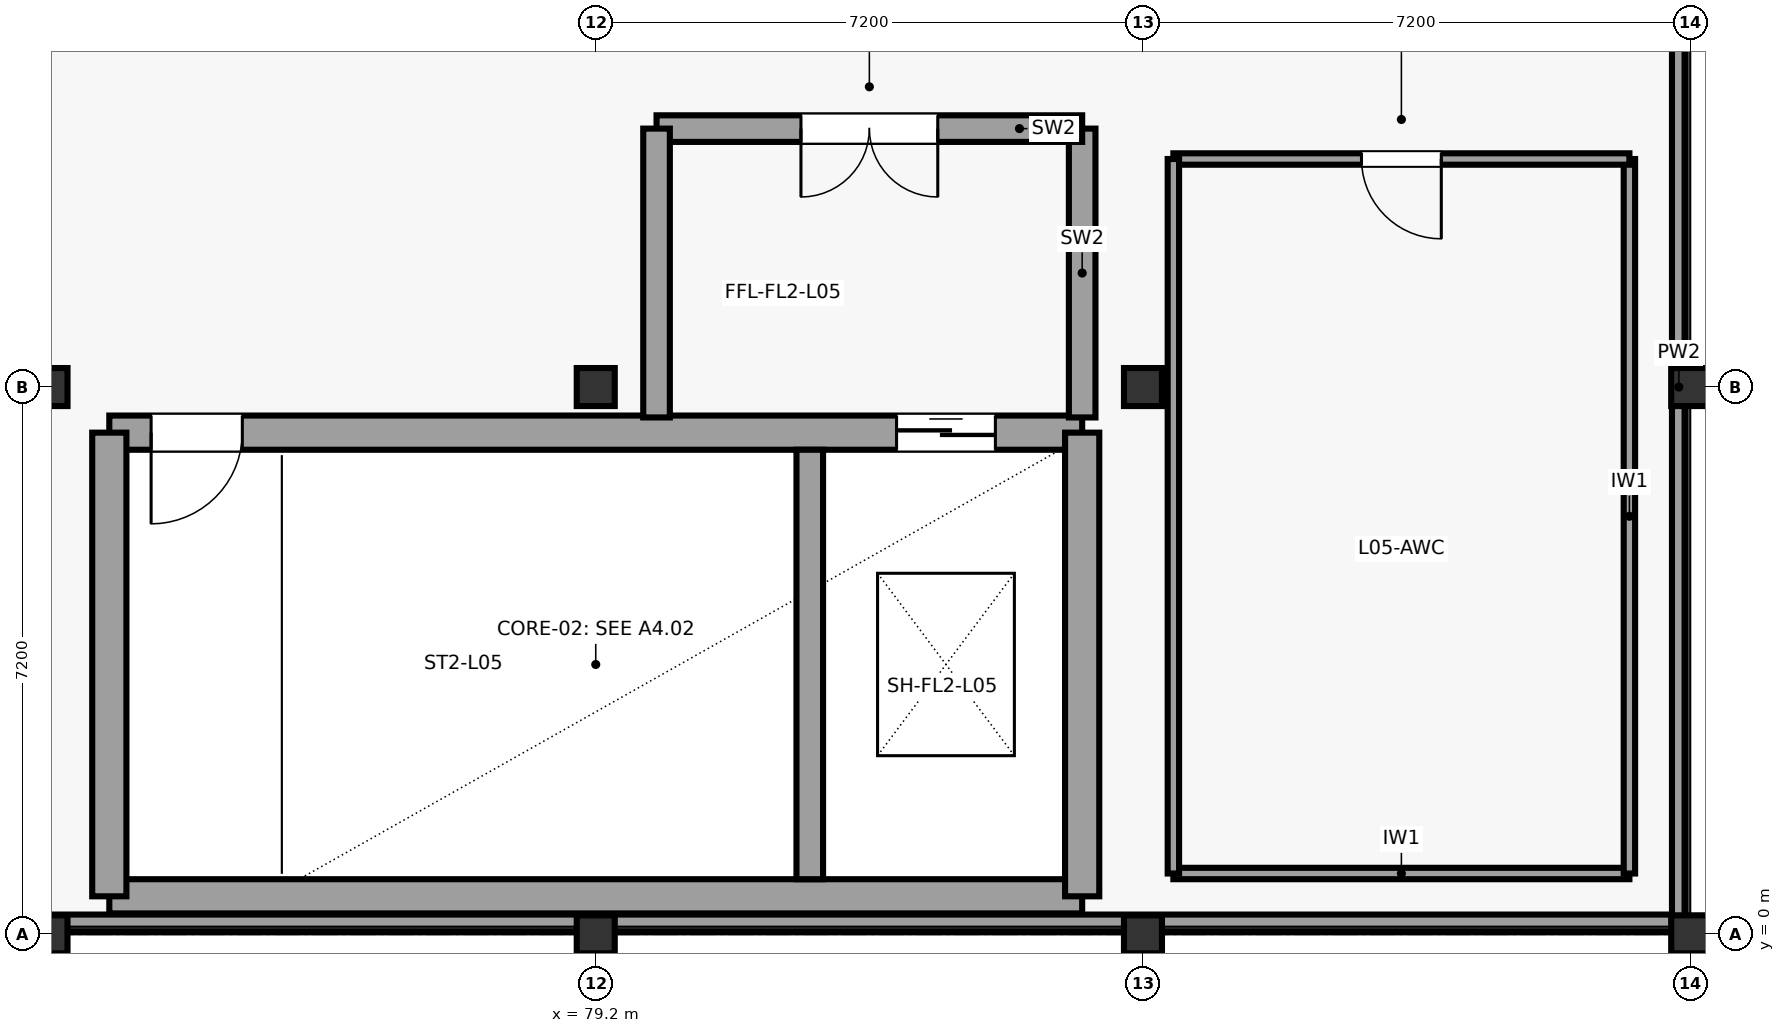
"""IFC4 building model, lengths in metres.
Left out: names, types, materials, properties, quantities, classifications, styles, units other than length and angle.
Written with IfcOpenShell. Run it as: python <this file> out.ifc"""

import sys

from ifc_helpers import new_model, si_unit, direction, frame, frame_2d, origin, origin_2d, place, context, subcontext, project, spatial, rectangle, extrude, element, fill, save


model = new_model("IFC4")
c1 = context("Model", 3, precision=1e-05, world=origin(), true_north=direction((0.0, 1.0)))
c2 = subcontext(c1, "Body", "Model", "MODEL_VIEW")
j1 = project(units=[si_unit("LENGTHUNIT", "METRE"), si_unit("PLANEANGLEUNIT", "RADIAN")], contexts=[c1])
p1 = place(None, origin())
s1 = spatial("IfcSite", under=j1, at=p1, CompositionType="ELEMENT")
p2 = place(p1, origin())
s2 = spatial("IfcBuilding", under=s1, at=p2, CompositionType="ELEMENT")
p3 = place(p2, frame((0.0, 0.0, 23.0)))
s3 = spatial("IfcBuildingStorey", under=s2, at=p3, CompositionType="ELEMENT", Elevation=23.0)
for number, where, z_axis, x_axis in (
    (1, (72.0, 0.0, 0.0), (0.0, 0.0, 1.0), (1.0, 0.0, 0.0)),
    (2, (72.0, 7.2, 0.0), (0.0, 0.0, 1.0), (1.0, 0.0, 0.0)),
    (3, (79.2, 0.0, 0.0), (0.0, 0.0, 1.0), (1.0, 0.0, 0.0)),
    (4, (79.2, 7.2, 0.0), (0.0, 0.0, 1.0), (1.0, 0.0, 0.0)),
    (5, (86.4, 0.0, 0.0), (0.0, 0.0, 1.0), (1.0, 0.0, 0.0)),
    (6, (86.4, 7.2, 0.0), (0.0, 0.0, 1.0), (1.0, 0.0, 0.0)),
    (7, (93.6, 0.0, 0.0), (0.0, 0.0, 1.0), (1.0, 0.0, 0.0)),
    (8, (93.6, 7.2, 0.0), (0.0, 0.0, 1.0), (1.0, 0.0, 0.0)),
):
    element("IfcColumn", number, at=place(p3, frame(where, z_axis=z_axis, x_axis=x_axis)), inside=s3, PredefinedType="COLUMN", context=c2, shape_type="SweptSolid", body=[
        extrude(rectangle(XDim=0.5, YDim=0.5, at=origin_2d()), origin(), (0.0, 0.0, 1.0), 4.5),
    ])
p4 = place(p3, frame((72.8, 0.5, 0.0), z_axis=(0.0, 0.0, 1.0), x_axis=(1.0, 0.0, 0.0)))
e9 = element("IfcWall", 9, at=p4, inside=s3, PredefinedType="SHEAR", context=c2, shape_type="SweptSolid", body=[
    extrude(rectangle(XDim=12.8, YDim=0.45, at=frame_2d((6.4, 0.0))), origin(), (0.0, 0.0, 1.0), 4.28),
])
p5 = place(p3, frame((72.8, 6.6, 0.0), z_axis=(0.0, 0.0, 1.0), x_axis=(1.0, 0.0, 0.0)))
e10 = element("IfcWall", 10, at=p5, inside=s3, PredefinedType="SHEAR", context=c2, shape_type="SweptSolid", body=[
    extrude(rectangle(XDim=12.8, YDim=0.45, at=frame_2d((6.4, 0.0))), origin(), (0.0, 0.0, 1.0), 4.28),
])
p6 = place(p5, frame((0.55, 0.0, 0.0)))
e11 = element("IfcOpeningElement", 11, at=p6, cuts=e10, PredefinedType="OPENING", context=c2, shape_type="SweptSolid", body=[
    extrude(rectangle(XDim=1.2, YDim=2.25, at=frame_2d((0.6, 1.125))), frame((0.0, 0.235, 0.0), z_axis=(0.0, -1.0, 0.0), x_axis=(1.0, 0.0, 0.0)), (0.0, 0.0, 1.0), 0.47),
])
p7 = place(p5, frame((10.358, 0.0, 0.0)))
e12 = element("IfcOpeningElement", 12, at=p7, cuts=e10, PredefinedType="OPENING", context=c2, shape_type="SweptSolid", body=[
    extrude(rectangle(XDim=1.3, YDim=2.25, at=frame_2d((0.65, 1.125))), frame((0.0, 0.235, 0.0), z_axis=(0.0, -1.0, 0.0), x_axis=(1.0, 0.0, 0.0)), (0.0, 0.0, 1.0), 0.47),
])
for number, where, z_axis, x_axis in (
    (13, (72.8, 0.5, 0.0), (0.0, 0.0, 1.0), (0.0, 1.0, 0.0)),
    (14, (85.6, 0.5, 0.0), (0.0, 0.0, 1.0), (0.0, 1.0, 0.0)),
):
    element("IfcWall", number, at=place(p3, frame(where, z_axis=z_axis, x_axis=x_axis)), inside=s3, PredefinedType="SHEAR", context=c2, shape_type="SweptSolid", body=[
        extrude(rectangle(XDim=6.1, YDim=0.45, at=frame_2d((3.05, 0.0))), origin(), (0.0, 0.0, 1.0), 4.28),
    ])
p8 = place(p3, frame((82.016, 0.725, 0.0), z_axis=(0.0, 0.0, 1.0), x_axis=(0.0, 1.0, 0.0)))
e15 = element("IfcWall", 15, at=p8, inside=s3, PredefinedType="SHEAR", context=c2, shape_type="SweptSolid", body=[
    extrude(rectangle(XDim=5.65, YDim=0.35, at=frame_2d((2.825, 0.0))), origin(), (0.0, 0.0, 1.0), 4.28),
])
p9 = place(p3, frame((0.15, 0.15, 4.5), z_axis=(0.0, 0.0, 1.0), x_axis=(1.0, 0.0, 0.0)))
e16 = element("IfcWall", 16, at=p9, inside=s3, PredefinedType="PARAPET", context=c2, shape_type="SweptSolid", body=[
    extrude(rectangle(XDim=93.3, YDim=0.22, at=frame_2d((46.65, 0.0))), origin(), (0.0, 0.0, 1.0), 1.15),
])
p10 = place(p3, frame((93.45, 0.15, 4.5), z_axis=(0.0, 0.0, 1.0), x_axis=(0.0, 1.0, 0.0)))
e17 = element("IfcWall", 17, at=p10, inside=s3, PredefinedType="PARAPET", context=c2, shape_type="SweptSolid", body=[
    extrude(rectangle(XDim=14.1, YDim=0.18, at=frame_2d((7.05, 0.0))), origin(), (0.0, 0.0, 1.0), 1.15),
])
p11 = place(p3, frame((85.6, 6.8, 0.0), z_axis=(0.0, 0.0, 1.0), x_axis=(0.0, 1.0, 0.0)))
e18 = element("IfcWall", 18, at=p11, inside=s3, PredefinedType="SHEAR", context=c2, shape_type="SweptSolid", body=[
    extrude(rectangle(XDim=3.8, YDim=0.35, at=frame_2d((1.9, 0.0))), origin(), (0.0, 0.0, 1.0), 3.34),
])
p12 = place(p3, frame((85.6, 10.6, 0.0), z_axis=(0.0, 0.0, 1.0), x_axis=(-1.0, 0.0, 0.0)))
e19 = element("IfcWall", 19, at=p12, inside=s3, PredefinedType="SHEAR", context=c2, shape_type="SweptSolid", body=[
    extrude(rectangle(XDim=5.6, YDim=0.35, at=frame_2d((2.8, 0.0))), origin(), (0.0, 0.0, 1.0), 3.34),
])
p13 = place(p12, frame((1.9, 0.0, 0.0)))
e20 = element("IfcOpeningElement", 20, at=p13, cuts=e19, PredefinedType="OPENING", context=c2, shape_type="SweptSolid", body=[
    extrude(rectangle(XDim=1.8, YDim=2.3, at=frame_2d((0.9, 1.15))), frame((0.0, 0.185, 0.0), z_axis=(0.0, -1.0, 0.0), x_axis=(1.0, 0.0, 0.0)), (0.0, 0.0, 1.0), 0.37),
])
p14 = place(p3, frame((80.0, 10.6, 0.0), z_axis=(0.0, 0.0, 1.0), x_axis=(0.0, -1.0, 0.0)))
e21 = element("IfcWall", 21, at=p14, inside=s3, PredefinedType="SHEAR", context=c2, shape_type="SweptSolid", body=[
    extrude(rectangle(XDim=3.8, YDim=0.35, at=frame_2d((1.9, 0.0))), origin(), (0.0, 0.0, 1.0), 3.34),
])
p15 = place(p3, frame((86.8, 0.8, 0.0), z_axis=(0.0, 0.0, 1.0), x_axis=(1.0, 0.0, 0.0)))
e22 = element("IfcWall", 22, at=p15, inside=s3, PredefinedType="PARTITIONING", context=c2, shape_type="SweptSolid", body=[
    extrude(rectangle(XDim=6.0, YDim=0.15, at=frame_2d((3.0, 0.0))), origin(), (0.0, 0.0, 1.0), 3.34),
])
p16 = place(p3, frame((92.8, 0.8, 0.0), z_axis=(0.0, 0.0, 1.0), x_axis=(0.0, 1.0, 0.0)))
e23 = element("IfcWall", 23, at=p16, inside=s3, PredefinedType="PARTITIONING", context=c2, shape_type="SweptSolid", body=[
    extrude(rectangle(XDim=9.4, YDim=0.15, at=frame_2d((4.7, 0.0))), origin(), (0.0, 0.0, 1.0), 3.34),
])
p17 = place(p3, frame((92.8, 10.2, 0.0), z_axis=(0.0, 0.0, 1.0), x_axis=(-1.0, 0.0, 0.0)))
e24 = element("IfcWall", 24, at=p17, inside=s3, PredefinedType="PARTITIONING", context=c2, shape_type="SweptSolid", body=[
    extrude(rectangle(XDim=6.0, YDim=0.15, at=frame_2d((3.0, 0.0))), origin(), (0.0, 0.0, 1.0), 3.34),
])
p18 = place(p17, frame((2.475, 0.0, 0.0)))
e25 = element("IfcOpeningElement", 25, at=p18, cuts=e24, PredefinedType="OPENING", context=c2, shape_type="SweptSolid", body=[
    extrude(rectangle(XDim=1.05, YDim=2.2, at=frame_2d((0.525, 1.1))), frame((0.0, 0.085, 0.0), z_axis=(0.0, -1.0, 0.0), x_axis=(1.0, 0.0, 0.0)), (0.0, 0.0, 1.0), 0.17),
])
p19 = place(p3, frame((86.8, 10.2, 0.0), z_axis=(0.0, 0.0, 1.0), x_axis=(0.0, -1.0, 0.0)))
e26 = element("IfcWall", 26, at=p19, inside=s3, PredefinedType="PARTITIONING", context=c2, shape_type="SweptSolid", body=[
    extrude(rectangle(XDim=9.4, YDim=0.15, at=frame_2d((4.7, 0.0))), origin(), (0.0, 0.0, 1.0), 3.34),
])
p20 = place(p6, frame((1.2, 0.0, 0.0), z_axis=(0.0, 0.0, 1.0), x_axis=(-1.0, 0.0, 0.0)))
e27 = element("IfcDoor", 27, at=p20, inside=s3, OperationType="SINGLE_SWING_LEFT", PredefinedType="DOOR", context=c2, shape_type="SweptSolid", body=[
    extrude(rectangle(XDim=1.2, YDim=2.25, at=frame_2d((0.6, 1.125))), frame((0.0, 0.025, 0.0), z_axis=(0.0, -1.0, 0.0), x_axis=(1.0, 0.0, 0.0)), (0.0, 0.0, 1.0), 0.05),
])
fill(e11, e27)
p21 = place(p7, origin())
e28 = element("IfcDoor", 28, at=p21, inside=s3, OperationType="SLIDING_TO_LEFT", PredefinedType="DOOR", context=c2, shape_type="SweptSolid", body=[
    extrude(rectangle(XDim=1.3, YDim=2.25, at=frame_2d((0.65, 1.125))), frame((0.0, 0.025, 0.0), z_axis=(0.0, -1.0, 0.0), x_axis=(1.0, 0.0, 0.0)), (0.0, 0.0, 1.0), 0.05),
])
fill(e12, e28)
p22 = place(p13, origin())
e29 = element("IfcDoor", 29, at=p22, inside=s3, OperationType="DOUBLE_DOOR_SINGLE_SWING", PredefinedType="DOOR", context=c2, shape_type="SweptSolid", body=[
    extrude(rectangle(XDim=1.8, YDim=2.3, at=frame_2d((0.9, 1.15))), frame((0.0, 0.025, 0.0), z_axis=(0.0, -1.0, 0.0), x_axis=(1.0, 0.0, 0.0)), (0.0, 0.0, 1.0), 0.05),
])
fill(e20, e29)
p23 = place(p18, origin())
e30 = element("IfcDoor", 30, at=p23, inside=s3, OperationType="SINGLE_SWING_LEFT", PredefinedType="DOOR", context=c2, shape_type="SweptSolid", body=[
    extrude(rectangle(XDim=1.05, YDim=2.2, at=frame_2d((0.525, 1.1))), frame((0.0, 0.025, 0.0), z_axis=(0.0, -1.0, 0.0), x_axis=(1.0, 0.0, 0.0)), (0.0, 0.0, 1.0), 0.05),
])
fill(e25, e30)
save(model, sys.argv[1])
